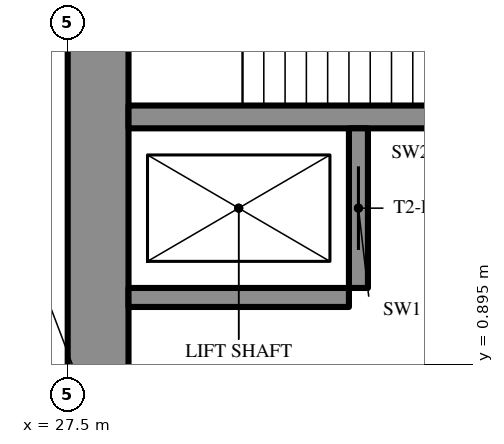
"""IFC4 building model, lengths in metres.
Left out: names, types, materials, properties, quantities, classifications, styles, units other than length and angle.
Written with IfcOpenShell. Run it as: python <this file> out.ifc"""

import sys

from ifc_helpers import new_model, si_unit, direction, frame, frame_2d, origin, place, context, subcontext, project, spatial, rectangle, extrude, element, fill, save


model = new_model("IFC4")
c1 = context("Model", 3, precision=1e-05, world=origin(), true_north=direction((0.0, 1.0)))
c2 = subcontext(c1, "Body", "Model", "MODEL_VIEW")
j1 = project(units=[si_unit("LENGTHUNIT", "METRE"), si_unit("PLANEANGLEUNIT", "RADIAN")], contexts=[c1])
p1 = place(None, origin())
s1 = spatial("IfcSite", under=j1, at=p1, CompositionType="ELEMENT")
p2 = place(p1, origin())
s2 = spatial("IfcBuilding", under=s1, at=p2, CompositionType="ELEMENT")
p3 = place(p2, frame((0.0, 0.0, 7.2)))
s3 = spatial("IfcBuildingStorey", under=s2, at=p3, CompositionType="ELEMENT", Elevation=7.2)
p4 = place(p3, frame((27.9, -8.6, 0.0), z_axis=(0.0, 0.0, 1.0), x_axis=(0.0, 1.0, 0.0)))
e1 = element("IfcWall", 1, at=p4, inside=s3, PredefinedType="SHEAR", context=c2, shape_type="SweptSolid", body=[
    extrude(rectangle(XDim=17.2, YDim=0.8, at=frame_2d((8.6, 0.0))), origin(), (0.0, 0.0, 1.0), 5.4),
])
p5 = place(p3, frame((28.3, 4.15, 0.0), z_axis=(0.0, 0.0, 1.0), x_axis=(1.0, 0.0, 0.0)))
e2 = element("IfcWall", 2, at=p5, inside=s3, PredefinedType="SHEAR", context=c2, shape_type="SweptSolid", body=[
    extrude(rectangle(XDim=8.4, YDim=0.3, at=frame_2d((4.2, 0.0))), origin(), (0.0, 0.0, 1.0), 5.4),
])
p6 = place(p3, frame((31.325, 1.9, 0.0), z_axis=(0.0, 0.0, 1.0), x_axis=(0.0, 1.0, 0.0)))
e3 = element("IfcWall", 3, at=p6, inside=s3, PredefinedType="SHEAR", context=c2, shape_type="SweptSolid", body=[
    extrude(rectangle(XDim=2.1, YDim=0.25, at=frame_2d((1.05, 0.0))), origin(), (0.0, 0.0, 1.0), 5.4),
])
p7 = place(p6, frame((0.5, 0.0, 0.0)))
e4 = element("IfcOpeningElement", 4, at=p7, cuts=e3, PredefinedType="OPENING", context=c2, shape_type="SweptSolid", body=[
    extrude(rectangle(XDim=1.1, YDim=2.2, at=frame_2d((0.55, 1.1))), frame((0.0, 0.135, 0.0), z_axis=(0.0, -1.0, 0.0), x_axis=(1.0, 0.0, 0.0)), (0.0, 0.0, 1.0), 0.27),
])
p8 = place(p3, frame((28.3, 1.775, 0.0), z_axis=(0.0, 0.0, 1.0), x_axis=(1.0, 0.0, 0.0)))
e5 = element("IfcWall", 5, at=p8, inside=s3, PredefinedType="SHEAR", context=c2, shape_type="SweptSolid", body=[
    extrude(rectangle(XDim=2.9, YDim=0.25, at=frame_2d((1.45, 0.0))), origin(), (0.0, 0.0, 1.0), 5.4),
])
p9 = place(p3, frame((27.2, -13.8, 0.0), z_axis=(0.0, 0.0, 1.0), x_axis=(0.866027159892, 0.499996958321, 0.0)))
e6 = element("IfcWall", 6, at=p9, inside=s3, PredefinedType="SHEAR", context=c2, shape_type="SweptSolid", body=[
    extrude(rectangle(XDim=27.947, YDim=2.0, at=frame_2d((13.973, 0.0))), origin(), (0.0, 0.0, 1.0), 5.4),
])
p10 = place(p9, frame((4.6, 0.0, 0.0)))
e7 = element("IfcOpeningElement", 7, at=p10, cuts=e6, PredefinedType="OPENING", context=c2, shape_type="SweptSolid", body=[
    extrude(rectangle(XDim=1.0, YDim=2.2, at=frame_2d((0.5, 1.1))), frame((0.0, 1.01, 0.0), z_axis=(0.0, -1.0, 0.0), x_axis=(1.0, 0.0, 0.0)), (0.0, 0.0, 1.0), 2.02),
])
p11 = place(p9, frame((13.395, 0.0, 0.0)))
e8 = element("IfcOpeningElement", 8, at=p11, cuts=e6, PredefinedType="OPENING", context=c2, shape_type="SweptSolid", body=[
    extrude(rectangle(XDim=1.8, YDim=2.2, at=frame_2d((0.9, 1.1))), frame((0.0, 1.01, 0.0), z_axis=(0.0, -1.0, 0.0), x_axis=(1.0, 0.0, 0.0)), (0.0, 0.0, 1.0), 2.02),
])
p12 = place(p3, frame((27.2, 13.8, 0.0), z_axis=(0.0, 0.0, 1.0), x_axis=(0.866024545924, -0.500001485854, 0.0)))
e9 = element("IfcWall", 9, at=p12, inside=s3, PredefinedType="SHEAR", context=c2, shape_type="SweptSolid", body=[
    extrude(rectangle(XDim=26.534, YDim=2.0, at=frame_2d((13.267, 0.0))), origin(), (0.0, 0.0, 1.0), 5.4),
])
p13 = place(p12, frame((4.6, 0.0, 0.0)))
e10 = element("IfcOpeningElement", 10, at=p13, cuts=e9, PredefinedType="OPENING", context=c2, shape_type="SweptSolid", body=[
    extrude(rectangle(XDim=1.0, YDim=2.2, at=frame_2d((0.5, 1.1))), frame((0.0, 1.01, 0.0), z_axis=(0.0, -1.0, 0.0), x_axis=(1.0, 0.0, 0.0)), (0.0, 0.0, 1.0), 2.02),
])
p14 = place(p12, frame((13.395, 0.0, 0.0)))
e11 = element("IfcOpeningElement", 11, at=p14, cuts=e9, PredefinedType="OPENING", context=c2, shape_type="SweptSolid", body=[
    extrude(rectangle(XDim=1.8, YDim=2.2, at=frame_2d((0.9, 1.1))), frame((0.0, 1.01, 0.0), z_axis=(0.0, -1.0, 0.0), x_axis=(1.0, 0.0, 0.0)), (0.0, 0.0, 1.0), 2.02),
])
p15 = place(p7, origin())
e12 = element("IfcDoor", 12, at=p15, inside=s3, OperationType="SLIDING_TO_LEFT", PredefinedType="USERDEFINED", context=c2, shape_type="SweptSolid", body=[
    extrude(rectangle(XDim=1.1, YDim=2.2, at=frame_2d((0.55, 1.1))), frame((0.0, 0.025, 0.0), z_axis=(0.0, -1.0, 0.0), x_axis=(1.0, 0.0, 0.0)), (0.0, 0.0, 1.0), 0.05),
])
fill(e4, e12)
save(model, sys.argv[1])
